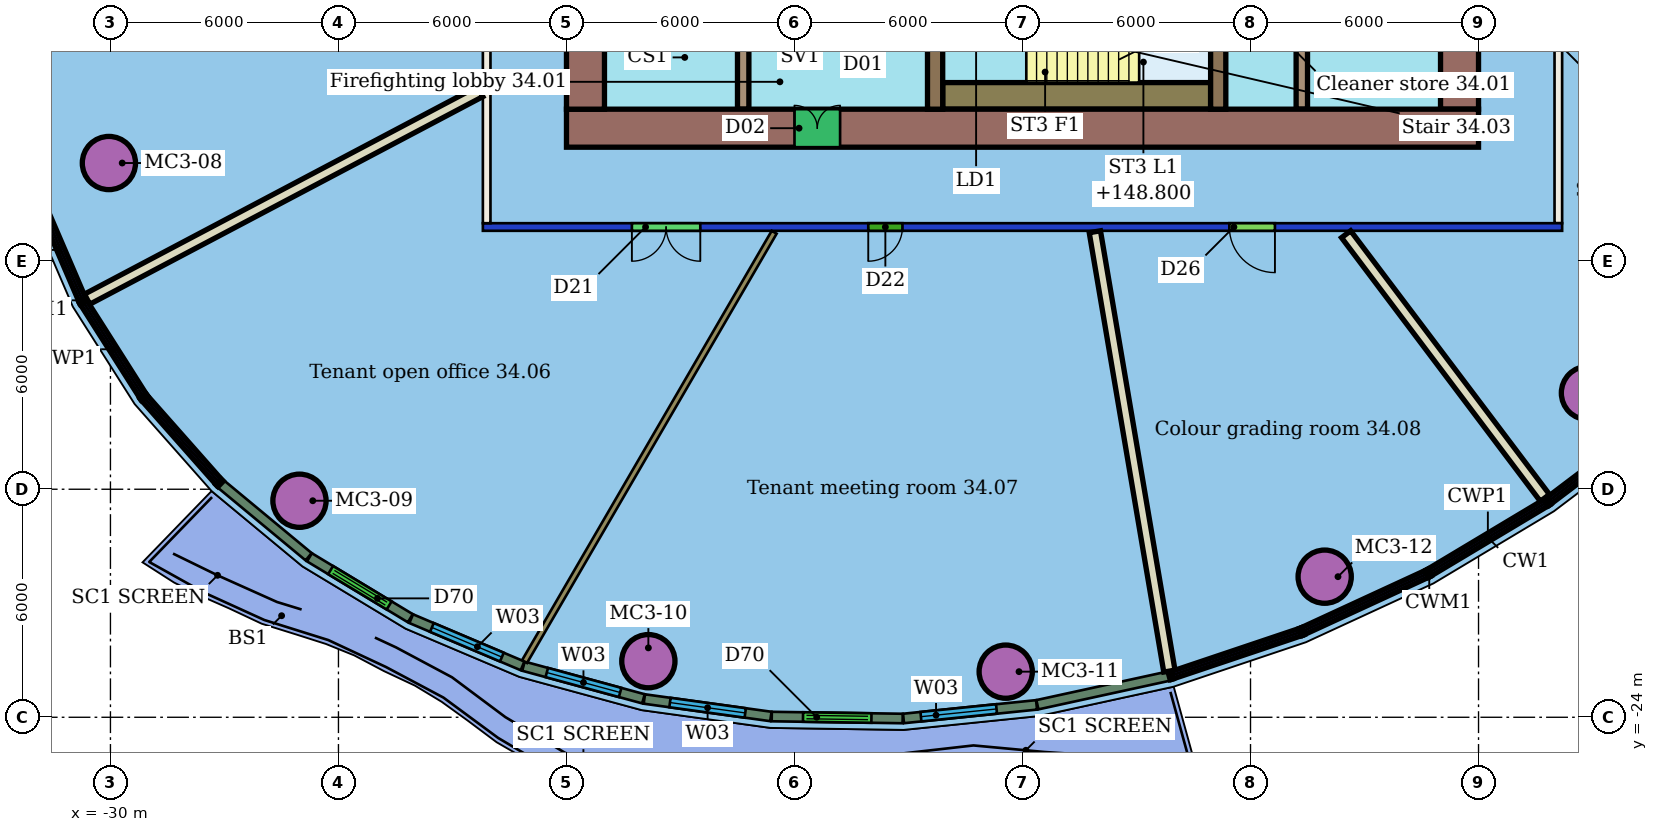
"""IFC4 building model, lengths in metres.
Left out: names, types, materials, properties, quantities, classifications, styles, units other than length and angle.
Written with IfcOpenShell. Run it as: python <this file> out.ifc"""

import sys

from ifc_helpers import new_model, si_unit, direction, frame, frame_2d, origin, origin_2d, place, context, subcontext, project, spatial, rectangle, hollow_circle, extrude, element, fill, save


model = new_model("IFC4")
c1 = context("Model", 3, precision=1e-05, world=origin(), true_north=direction((0.0, 1.0)))
c2 = subcontext(c1, "Body", "Model", "MODEL_VIEW")
j1 = project(units=[si_unit("LENGTHUNIT", "METRE"), si_unit("PLANEANGLEUNIT", "RADIAN")], contexts=[c1])
p1 = place(None, origin())
s1 = spatial("IfcSite", under=j1, at=p1, CompositionType="ELEMENT")
p2 = place(p1, origin())
s2 = spatial("IfcBuilding", under=s1, at=p2, CompositionType="ELEMENT")
p3 = place(p2, frame((0.0, 0.0, 147.0)))
s3 = spatial("IfcBuildingStorey", under=s2, at=p3, CompositionType="ELEMENT", Elevation=147.0)
for number, where, z_axis, x_axis in (
    (1, (-30.041, -9.417, 0.0), (0.0, 0.0, 1.0), (1.0, 0.0, 0.0)),
    (2, (-25.026, -18.303, 0.0), (0.0, 0.0, 1.0), (1.0, 0.0, 0.0)),
    (3, (-15.845, -22.524, 0.0), (0.0, 0.0, 1.0), (1.0, 0.0, 0.0)),
    (4, (-6.442, -22.8, 0.0), (0.0, 0.0, 1.0), (1.0, 0.0, 0.0)),
    (5, (1.952, -20.301, 0.0), (0.0, 0.0, 1.0), (1.0, 0.0, 0.0)),
    (6, (8.879, -15.467, 0.0), (0.0, 0.0, 1.0), (1.0, 0.0, 0.0)),
):
    element("IfcColumn", number, at=place(p3, frame(where, z_axis=z_axis, x_axis=x_axis)), inside=s3, PredefinedType="COLUMN", context=c2, shape_type="SweptSolid", body=[
        extrude(hollow_circle(Radius=0.7, WallThickness=0.05, at=origin_2d()), origin(), (0.0, 0.0, 1.0), 3.45),
    ])
p4 = place(p3, frame((8.2, -11.1, 0.0), z_axis=(0.0, 0.0, 1.0), x_axis=(-1.0, 0.0, 0.0)))
e7 = element("IfcWall", 7, at=p4, inside=s3, PredefinedType="PARTITIONING", context=c2, shape_type="SweptSolid", body=[
    extrude(rectangle(XDim=28.4, YDim=0.2, at=frame_2d((14.2, 0.0))), origin(), (0.0, 0.0, 1.0), 3.05),
])
p5 = place(p4, frame((22.679, 0.0, 0.0)))
e8 = element("IfcOpeningElement", 8, at=p5, cuts=e7, PredefinedType="OPENING", context=c2, shape_type="SweptSolid", body=[
    extrude(rectangle(XDim=1.8, YDim=2.1, at=frame_2d((0.9, 1.05))), frame((0.0, 0.11, 0.0), z_axis=(0.0, -1.0, 0.0), x_axis=(1.0, 0.0, 0.0)), (0.0, 0.0, 1.0), 0.22),
])
p6 = place(p4, frame((17.359, 0.0, 0.0)))
e9 = element("IfcOpeningElement", 9, at=p6, cuts=e7, PredefinedType="OPENING", context=c2, shape_type="SweptSolid", body=[
    extrude(rectangle(XDim=0.9, YDim=2.1, at=frame_2d((0.45, 1.05))), frame((0.0, 0.11, 0.0), z_axis=(0.0, -1.0, 0.0), x_axis=(1.0, 0.0, 0.0)), (0.0, 0.0, 1.0), 0.22),
])
p7 = place(p4, frame((7.557, 0.0, 0.0)))
e10 = element("IfcOpeningElement", 10, at=p7, cuts=e7, PredefinedType="OPENING", context=c2, shape_type="SweptSolid", body=[
    extrude(rectangle(XDim=1.2, YDim=2.1, at=frame_2d((0.6, 1.05))), frame((0.0, 0.11, 0.0), z_axis=(0.0, -1.0, 0.0), x_axis=(1.0, 0.0, 0.0)), (0.0, 0.0, 1.0), 0.22),
])
p8 = place(p3, frame((-20.1, -11.0, 0.0), z_axis=(0.0, 0.0, 1.0), x_axis=(0.0, 1.0, 0.0)))
e11 = element("IfcWall", 11, at=p8, inside=s3, PredefinedType="PARTITIONING", context=c2, shape_type="SweptSolid", body=[
    extrude(rectangle(XDim=22.0, YDim=0.2, at=frame_2d((11.0, 0.0))), origin(), (0.0, 0.0, 1.0), 3.45),
])
p9 = place(p8, frame((15.041, 0.0, 0.0)))
e12 = element("IfcOpeningElement", 12, at=p9, cuts=e11, PredefinedType="OPENING", context=c2, shape_type="SweptSolid", body=[
    extrude(rectangle(XDim=1.0, YDim=2.1, at=frame_2d((0.5, 1.05))), frame((0.0, 0.11, 0.0), z_axis=(0.0, -1.0, 0.0), x_axis=(1.0, 0.0, 0.0)), (0.0, 0.0, 1.0), 0.22),
])
p10 = place(p8, frame((9.277, 0.0, 0.0)))
e13 = element("IfcOpeningElement", 13, at=p10, cuts=e11, PredefinedType="OPENING", context=c2, shape_type="SweptSolid", body=[
    extrude(rectangle(XDim=1.8, YDim=2.4, at=frame_2d((0.9, 1.2))), frame((0.0, 0.11, 0.0), z_axis=(0.0, -1.0, 0.0), x_axis=(1.0, 0.0, 0.0)), (0.0, 0.0, 1.0), 0.22),
])
p11 = place(p3, frame((8.1, 11.0, 0.0), z_axis=(0.0, 0.0, 1.0), x_axis=(0.0, -1.0, 0.0)))
e14 = element("IfcWall", 14, at=p11, inside=s3, PredefinedType="PARTITIONING", context=c2, shape_type="SweptSolid", body=[
    extrude(rectangle(XDim=22.0, YDim=0.2, at=frame_2d((11.0, 0.0))), origin(), (0.0, 0.0, 1.0), 3.45),
])
p12 = place(p11, frame((16.187, 0.0, 0.0)))
e15 = element("IfcOpeningElement", 15, at=p12, cuts=e14, PredefinedType="OPENING", context=c2, shape_type="SweptSolid", body=[
    extrude(rectangle(XDim=1.2, YDim=2.1, at=frame_2d((0.6, 1.05))), frame((0.0, 0.11, 0.0), z_axis=(0.0, -1.0, 0.0), x_axis=(1.0, 0.0, 0.0)), (0.0, 0.0, 1.0), 0.22),
])
p13 = place(p11, frame((8.659, 0.0, 0.0)))
e16 = element("IfcOpeningElement", 16, at=p13, cuts=e14, PredefinedType="OPENING", context=c2, shape_type="SweptSolid", body=[
    extrude(rectangle(XDim=1.8, YDim=2.1, at=frame_2d((0.9, 1.05))), frame((0.0, 0.11, 0.0), z_axis=(0.0, -1.0, 0.0), x_axis=(1.0, 0.0, 0.0)), (0.0, 0.0, 1.0), 0.22),
])
p14 = place(p3, frame((-30.613, -12.999, 0.0), z_axis=(0.0, 0.0, 1.0), x_axis=(0.884254045952, 0.46700619077, 0.0)))
e17 = element("IfcWall", 17, at=p14, inside=s3, PredefinedType="PARTITIONING", context=c2, shape_type="SweptSolid", body=[
    extrude(rectangle(XDim=11.697, YDim=0.3, at=frame_2d((5.849, 0.0))), origin(), (0.0, 0.0, 1.0), 3.45),
])
p15 = place(p3, frame((-19.103, -22.534, 0.0), z_axis=(0.0, 0.0, 1.0), x_axis=(0.502674036835, 0.864476033613, 0.0)))
e18 = element("IfcWall", 18, at=p15, inside=s3, PredefinedType="PARTITIONING", context=c2, shape_type="SweptSolid", body=[
    extrude(rectangle(XDim=13.067, YDim=0.15, at=frame_2d((6.534, 0.0))), origin(), (0.0, 0.0, 1.0), 3.45),
])
p16 = place(p3, frame((-2.135, -22.786, 0.0), z_axis=(0.0, 0.0, 1.0), x_axis=(-0.167234468918, 0.985917152912, 0.0)))
e19 = element("IfcWall", 19, at=p16, inside=s3, PredefinedType="PARTITIONING", context=c2, shape_type="SweptSolid", body=[
    extrude(rectangle(XDim=11.726, YDim=0.3, at=frame_2d((5.863, 0.0))), origin(), (0.0, 0.0, 1.0), 3.45),
])
p17 = place(p3, frame((7.746, -18.227, 0.0), z_axis=(0.0, 0.0, 1.0), x_axis=(-0.602106567293, 0.798415732324, 0.0)))
e20 = element("IfcWall", 20, at=p17, inside=s3, PredefinedType="PARTITIONING", context=c2, shape_type="SweptSolid", body=[
    extrude(rectangle(XDim=8.688, YDim=0.3, at=frame_2d((4.344, 0.0))), origin(), (0.0, 0.0, 1.0), 3.45),
])
p18 = place(p3, frame((-27.088, -17.867, 0.0), z_axis=(0.0, 0.0, 1.0), x_axis=(0.769904678532, -0.638158903389, 0.0)))
e21 = element("IfcWall", 21, at=p18, inside=s3, PredefinedType="SOLIDWALL", context=c2, shape_type="SweptSolid", body=[
    extrude(rectangle(XDim=2.991, YDim=0.25, at=frame_2d((1.496, 0.0))), origin(), (0.0, 0.0, 1.0), 3.1),
])
p19 = place(p3, frame((-24.763, -19.791, 0.0), z_axis=(0.0, 0.0, 1.0), x_axis=(0.856079561846, -0.516844061386, 0.0)))
e22 = element("IfcWall", 22, at=p19, inside=s3, PredefinedType="SOLIDWALL", context=c2, shape_type="SweptSolid", body=[
    extrude(rectangle(XDim=3.101, YDim=0.25, at=frame_2d((1.551, 0.0))), origin(), (0.0, 0.0, 1.0), 3.1),
])
p20 = place(p19, frame((0.65, 0.0, 0.0)))
e23 = element("IfcOpeningElement", 23, at=p20, cuts=e22, PredefinedType="OPENING", context=c2, shape_type="SweptSolid", body=[
    extrude(rectangle(XDim=1.8, YDim=2.4, at=frame_2d((0.9, 1.2))), frame((0.0, 0.135, 0.0), z_axis=(0.0, -1.0, 0.0), x_axis=(1.0, 0.0, 0.0)), (0.0, 0.0, 1.0), 0.27),
])
p21 = place(p3, frame((-22.086, -21.406, 0.0), z_axis=(0.0, 0.0, 1.0), x_axis=(0.920752187735, -0.390147931919, 0.0)))
e24 = element("IfcWall", 24, at=p21, inside=s3, PredefinedType="SOLIDWALL", context=c2, shape_type="SweptSolid", body=[
    extrude(rectangle(XDim=3.183, YDim=0.25, at=frame_2d((1.591, 0.0))), origin(), (0.0, 0.0, 1.0), 3.1),
])
p22 = place(p21, frame((0.591, 0.0, 0.9)))
e25 = element("IfcOpeningElement", 25, at=p22, cuts=e24, PredefinedType="OPENING", context=c2, shape_type="SweptSolid", body=[
    extrude(rectangle(XDim=2.0, YDim=2.1, at=frame_2d((1.0, 1.05))), frame((0.0, 0.135, 0.0), z_axis=(0.0, -1.0, 0.0), x_axis=(1.0, 0.0, 0.0)), (0.0, 0.0, 1.0), 0.27),
])
p23 = place(p3, frame((-19.132, -22.656, 0.0), z_axis=(0.0, 0.0, 1.0), x_axis=(0.964946127674, -0.262448034261, 0.0)))
e26 = element("IfcWall", 26, at=p23, inside=s3, PredefinedType="SOLIDWALL", context=c2, shape_type="SweptSolid", body=[
    extrude(rectangle(XDim=3.272, YDim=0.25, at=frame_2d((1.636, 0.0))), origin(), (0.0, 0.0, 1.0), 3.1),
])
p24 = place(p23, frame((0.636, 0.0, 0.9)))
e27 = element("IfcOpeningElement", 27, at=p24, cuts=e26, PredefinedType="OPENING", context=c2, shape_type="SweptSolid", body=[
    extrude(rectangle(XDim=2.0, YDim=2.1, at=frame_2d((1.0, 1.05))), frame((0.0, 0.135, 0.0), z_axis=(0.0, -1.0, 0.0), x_axis=(1.0, 0.0, 0.0)), (0.0, 0.0, 1.0), 0.27),
])
p25 = place(p3, frame((-15.951, -23.519, 0.0), z_axis=(0.0, 0.0, 1.0), x_axis=(0.990602473809, -0.13677258089, 0.0)))
e28 = element("IfcWall", 28, at=p25, inside=s3, PredefinedType="SOLIDWALL", context=c2, shape_type="SweptSolid", body=[
    extrude(rectangle(XDim=3.361, YDim=0.25, at=frame_2d((1.681, 0.0))), origin(), (0.0, 0.0, 1.0), 3.1),
])
p26 = place(p25, frame((0.681, 0.0, 0.9)))
e29 = element("IfcOpeningElement", 29, at=p26, cuts=e28, PredefinedType="OPENING", context=c2, shape_type="SweptSolid", body=[
    extrude(rectangle(XDim=2.0, YDim=2.1, at=frame_2d((1.0, 1.05))), frame((0.0, 0.135, 0.0), z_axis=(0.0, -1.0, 0.0), x_axis=(1.0, 0.0, 0.0)), (0.0, 0.0, 1.0), 0.27),
])
p27 = place(p3, frame((-12.598, -23.981, 0.0), z_axis=(0.0, 0.0, 1.0), x_axis=(0.999886095883, -0.015092887706, 0.0)))
e30 = element("IfcWall", 30, at=p27, inside=s3, PredefinedType="SOLIDWALL", context=c2, shape_type="SweptSolid", body=[
    extrude(rectangle(XDim=3.446, YDim=0.25, at=frame_2d((1.723, 0.0))), origin(), (0.0, 0.0, 1.0), 3.1),
])
p28 = place(p27, frame((0.823, 0.0, 0.0)))
e31 = element("IfcOpeningElement", 31, at=p28, cuts=e30, PredefinedType="OPENING", context=c2, shape_type="SweptSolid", body=[
    extrude(rectangle(XDim=1.8, YDim=2.4, at=frame_2d((0.9, 1.2))), frame((0.0, 0.135, 0.0), z_axis=(0.0, -1.0, 0.0), x_axis=(1.0, 0.0, 0.0)), (0.0, 0.0, 1.0), 0.27),
])
p29 = place(p3, frame((-9.131, -24.032, 0.0), z_axis=(0.0, 0.0, 1.0), x_axis=(0.994814248005, 0.101708465554, 0.0)))
e32 = element("IfcWall", 32, at=p29, inside=s3, PredefinedType="SOLIDWALL", context=c2, shape_type="SweptSolid", body=[
    extrude(rectangle(XDim=3.519, YDim=0.25, at=frame_2d((1.76, 0.0))), origin(), (0.0, 0.0, 1.0), 3.1),
])
p30 = place(p29, frame((0.46, 0.0, 0.9)))
e33 = element("IfcOpeningElement", 33, at=p30, cuts=e32, PredefinedType="OPENING", context=c2, shape_type="SweptSolid", body=[
    extrude(rectangle(XDim=2.0, YDim=2.1, at=frame_2d((1.0, 1.05))), frame((0.0, 0.135, 0.0), z_axis=(0.0, -1.0, 0.0), x_axis=(1.0, 0.0, 0.0)), (0.0, 0.0, 1.0), 0.27),
])
p31 = place(p3, frame((-5.608, -23.67, 0.0), z_axis=(0.0, 0.0, 1.0), x_axis=(0.97705524613, 0.212986023038, 0.0)))
e34 = element("IfcWall", 34, at=p31, inside=s3, PredefinedType="SOLIDWALL", context=c2, shape_type="SweptSolid", body=[
    extrude(rectangle(XDim=3.534, YDim=0.25, at=frame_2d((1.767, 0.0))), origin(), (0.0, 0.0, 1.0), 3.1),
])
p32 = place(p3, frame((-18.0, -8.5, 0.0), z_axis=(0.0, 0.0, 1.0), x_axis=(1.0, 0.0, 0.0)))
e35 = element("IfcWall", 35, at=p32, inside=s3, PredefinedType="SHEAR", context=c2, shape_type="SweptSolid", body=[
    extrude(rectangle(XDim=24.0, YDim=1.0, at=frame_2d((12.0, 0.0))), origin(), (0.0, 0.0, 1.0), 3.3),
])
p33 = place(p32, frame((6.0, 0.0, 0.0)))
e36 = element("IfcOpeningElement", 36, at=p33, cuts=e35, PredefinedType="OPENING", context=c2, shape_type="SweptSolid", body=[
    extrude(rectangle(XDim=1.2, YDim=2.1, at=frame_2d((0.6, 1.05))), frame((0.0, 0.51, 0.0), z_axis=(0.0, -1.0, 0.0), x_axis=(1.0, 0.0, 0.0)), (0.0, 0.0, 1.0), 1.02),
])
p34 = place(p3, frame((-17.5, 8.0, 0.0), z_axis=(0.0, 0.0, 1.0), x_axis=(0.0, -1.0, 0.0)))
e37 = element("IfcWall", 37, at=p34, inside=s3, PredefinedType="SHEAR", context=c2, shape_type="SweptSolid", body=[
    extrude(rectangle(XDim=16.0, YDim=1.0, at=frame_2d((8.0, 0.0))), origin(), (0.0, 0.0, 1.0), 3.3),
])
p35 = place(p34, frame((11.9, 0.0, 0.0)))
e38 = element("IfcOpeningElement", 38, at=p35, cuts=e37, PredefinedType="OPENING", context=c2, shape_type="SweptSolid", body=[
    extrude(rectangle(XDim=1.2, YDim=2.1, at=frame_2d((0.6, 1.05))), frame((0.0, 0.51, 0.0), z_axis=(0.0, -1.0, 0.0), x_axis=(1.0, 0.0, 0.0)), (0.0, 0.0, 1.0), 1.02),
])
p36 = place(p34, frame((2.9, 0.0, 0.0)))
e39 = element("IfcOpeningElement", 39, at=p36, cuts=e37, PredefinedType="OPENING", context=c2, shape_type="SweptSolid", body=[
    extrude(rectangle(XDim=1.2, YDim=2.1, at=frame_2d((0.6, 1.05))), frame((0.0, 0.51, 0.0), z_axis=(0.0, -1.0, 0.0), x_axis=(1.0, 0.0, 0.0)), (0.0, 0.0, 1.0), 1.02),
])
p37 = place(p3, frame((5.5, -8.0, 0.0), z_axis=(0.0, 0.0, 1.0), x_axis=(0.0, 1.0, 0.0)))
e40 = element("IfcWall", 40, at=p37, inside=s3, PredefinedType="SHEAR", context=c2, shape_type="SweptSolid", body=[
    extrude(rectangle(XDim=16.0, YDim=1.0, at=frame_2d((8.0, 0.0))), origin(), (0.0, 0.0, 1.0), 3.3),
])
p38 = place(p37, frame((2.9, 0.0, 0.0)))
e41 = element("IfcOpeningElement", 41, at=p38, cuts=e40, PredefinedType="OPENING", context=c2, shape_type="SweptSolid", body=[
    extrude(rectangle(XDim=1.2, YDim=2.1, at=frame_2d((0.6, 1.05))), frame((0.0, 0.51, 0.0), z_axis=(0.0, -1.0, 0.0), x_axis=(1.0, 0.0, 0.0)), (0.0, 0.0, 1.0), 1.02),
])
p39 = place(p37, frame((11.9, 0.0, 0.0)))
e42 = element("IfcOpeningElement", 42, at=p39, cuts=e40, PredefinedType="OPENING", context=c2, shape_type="SweptSolid", body=[
    extrude(rectangle(XDim=1.2, YDim=2.1, at=frame_2d((0.6, 1.05))), frame((0.0, 0.51, 0.0), z_axis=(0.0, -1.0, 0.0), x_axis=(1.0, 0.0, 0.0)), (0.0, 0.0, 1.0), 1.02),
])
p40 = place(p3, frame((-13.35, 8.0, 0.0), z_axis=(0.0, 0.0, 1.0), x_axis=(0.0, -1.0, 0.0)))
e43 = element("IfcWall", 43, at=p40, inside=s3, PredefinedType="SHEAR", context=c2, shape_type="SweptSolid", body=[
    extrude(rectangle(XDim=16.0, YDim=0.3, at=frame_2d((8.0, 0.0))), origin(), (0.0, 0.0, 1.0), 3.3),
])
p41 = place(p40, frame((7.25, 0.0, 0.0)))
e44 = element("IfcOpeningElement", 44, at=p41, cuts=e43, PredefinedType="OPENING", context=c2, shape_type="SweptSolid", body=[
    extrude(rectangle(XDim=1.5, YDim=2.1, at=frame_2d((0.75, 1.05))), frame((0.0, 0.16, 0.0), z_axis=(0.0, -1.0, 0.0), x_axis=(1.0, 0.0, 0.0)), (0.0, 0.0, 1.0), 0.32),
])
p42 = place(p3, frame((1.35, -8.0, 0.0), z_axis=(0.0, 0.0, 1.0), x_axis=(0.0, 1.0, 0.0)))
e45 = element("IfcWall", 45, at=p42, inside=s3, PredefinedType="SHEAR", context=c2, shape_type="SweptSolid", body=[
    extrude(rectangle(XDim=16.0, YDim=0.3, at=frame_2d((8.0, 0.0))), origin(), (0.0, 0.0, 1.0), 3.3),
])
p43 = place(p42, frame((1.91, 0.0, 0.0)))
e46 = element("IfcOpeningElement", 46, at=p43, cuts=e45, PredefinedType="OPENING", context=c2, shape_type="SweptSolid", body=[
    extrude(rectangle(XDim=1.0, YDim=2.1, at=frame_2d((0.5, 1.05))), frame((0.0, 0.16, 0.0), z_axis=(0.0, -1.0, 0.0), x_axis=(1.0, 0.0, 0.0)), (0.0, 0.0, 1.0), 0.32),
])
p44 = place(p42, frame((7.25, 0.0, 0.0)))
e47 = element("IfcOpeningElement", 47, at=p44, cuts=e45, PredefinedType="OPENING", context=c2, shape_type="SweptSolid", body=[
    extrude(rectangle(XDim=1.5, YDim=2.1, at=frame_2d((0.75, 1.05))), frame((0.0, 0.16, 0.0), z_axis=(0.0, -1.0, 0.0), x_axis=(1.0, 0.0, 0.0)), (0.0, 0.0, 1.0), 0.32),
])
p45 = place(p3, frame((-8.3, -3.88, 0.0), z_axis=(0.0, 0.0, 1.0), x_axis=(0.0, -1.0, 0.0)))
e48 = element("IfcWall", 48, at=p45, inside=s3, PredefinedType="SHEAR", context=c2, shape_type="SweptSolid", body=[
    extrude(rectangle(XDim=4.12, YDim=0.4, at=frame_2d((2.06, 0.0))), origin(), (0.0, 0.0, 1.0), 3.3),
])
p46 = place(p45, frame((1.11, 0.0, 0.0)))
e49 = element("IfcOpeningElement", 49, at=p46, cuts=e48, PredefinedType="OPENING", context=c2, shape_type="SweptSolid", body=[
    extrude(rectangle(XDim=1.2, YDim=2.1, at=frame_2d((0.6, 1.05))), frame((0.0, 0.21, 0.0), z_axis=(0.0, -1.0, 0.0), x_axis=(1.0, 0.0, 0.0)), (0.0, 0.0, 1.0), 0.42),
])
p47 = place(p3, frame((-0.85, -3.88, 0.0), z_axis=(0.0, 0.0, 1.0), x_axis=(0.0, -1.0, 0.0)))
e50 = element("IfcWall", 50, at=p47, inside=s3, PredefinedType="SHEAR", context=c2, shape_type="SweptSolid", body=[
    extrude(rectangle(XDim=4.12, YDim=0.4, at=frame_2d((2.06, 0.0))), origin(), (0.0, 0.0, 1.0), 3.3),
])
p48 = place(p3, frame((-8.1, -7.65, 0.0), z_axis=(0.0, 0.0, 1.0), x_axis=(1.0, 0.0, 0.0)))
e51 = element("IfcWall", 51, at=p48, inside=s3, PredefinedType="SHEAR", context=c2, shape_type="SweptSolid", body=[
    extrude(rectangle(XDim=7.05, YDim=0.7, at=frame_2d((3.525, 0.0))), origin(), (0.0, 0.0, 1.0), 3.3),
])
p49 = place(p5, origin())
e52 = element("IfcDoor", 52, at=p49, inside=s3, OperationType="DOUBLE_DOOR_SINGLE_SWING", PredefinedType="DOOR", context=c2, shape_type="SweptSolid", body=[
    extrude(rectangle(XDim=1.8, YDim=2.1, at=frame_2d((0.9, 1.05))), frame((0.0, 0.025, 0.0), z_axis=(0.0, -1.0, 0.0), x_axis=(1.0, 0.0, 0.0)), (0.0, 0.0, 1.0), 0.05),
])
fill(e8, e52)
p50 = place(p6, origin())
e53 = element("IfcDoor", 53, at=p50, inside=s3, OperationType="SINGLE_SWING_RIGHT", PredefinedType="DOOR", context=c2, shape_type="SweptSolid", body=[
    extrude(rectangle(XDim=0.9, YDim=2.1, at=frame_2d((0.45, 1.05))), frame((0.0, 0.025, 0.0), z_axis=(0.0, -1.0, 0.0), x_axis=(1.0, 0.0, 0.0)), (0.0, 0.0, 1.0), 0.05),
])
fill(e9, e53)
p51 = place(p7, origin())
e54 = element("IfcDoor", 54, at=p51, inside=s3, OperationType="SINGLE_SWING_LEFT", PredefinedType="DOOR", context=c2, shape_type="SweptSolid", body=[
    extrude(rectangle(XDim=1.2, YDim=2.1, at=frame_2d((0.6, 1.05))), frame((0.0, 0.025, 0.0), z_axis=(0.0, -1.0, 0.0), x_axis=(1.0, 0.0, 0.0)), (0.0, 0.0, 1.0), 0.05),
])
fill(e10, e54)
p52 = place(p20, origin())
e55 = element("IfcDoor", 55, at=p52, inside=s3, OperationType="DOUBLE_DOOR_SLIDING", PredefinedType="DOOR", context=c2, shape_type="SweptSolid", body=[
    extrude(rectangle(XDim=1.8, YDim=2.4, at=frame_2d((0.9, 1.2))), frame((0.0, 0.025, 0.0), z_axis=(0.0, -1.0, 0.0), x_axis=(1.0, 0.0, 0.0)), (0.0, 0.0, 1.0), 0.05),
])
fill(e23, e55)
p53 = place(p22, origin())
e56 = element("IfcWindow", 56, at=p53, inside=s3, PartitioningType="SINGLE_PANEL", PredefinedType="WINDOW", context=c2, shape_type="SweptSolid", body=[
    extrude(rectangle(XDim=2.0, YDim=2.1, at=frame_2d((1.0, 1.05))), frame((0.0, 0.03, 0.0), z_axis=(0.0, -1.0, 0.0), x_axis=(1.0, 0.0, 0.0)), (0.0, 0.0, 1.0), 0.06),
])
fill(e25, e56)
p54 = place(p24, origin())
e57 = element("IfcWindow", 57, at=p54, inside=s3, PartitioningType="SINGLE_PANEL", PredefinedType="WINDOW", context=c2, shape_type="SweptSolid", body=[
    extrude(rectangle(XDim=2.0, YDim=2.1, at=frame_2d((1.0, 1.05))), frame((0.0, 0.03, 0.0), z_axis=(0.0, -1.0, 0.0), x_axis=(1.0, 0.0, 0.0)), (0.0, 0.0, 1.0), 0.06),
])
fill(e27, e57)
p55 = place(p26, origin())
e58 = element("IfcWindow", 58, at=p55, inside=s3, PartitioningType="SINGLE_PANEL", PredefinedType="WINDOW", context=c2, shape_type="SweptSolid", body=[
    extrude(rectangle(XDim=2.0, YDim=2.1, at=frame_2d((1.0, 1.05))), frame((0.0, 0.03, 0.0), z_axis=(0.0, -1.0, 0.0), x_axis=(1.0, 0.0, 0.0)), (0.0, 0.0, 1.0), 0.06),
])
fill(e29, e58)
p56 = place(p28, origin())
e59 = element("IfcDoor", 59, at=p56, inside=s3, OperationType="DOUBLE_DOOR_SLIDING", PredefinedType="DOOR", context=c2, shape_type="SweptSolid", body=[
    extrude(rectangle(XDim=1.8, YDim=2.4, at=frame_2d((0.9, 1.2))), frame((0.0, 0.025, 0.0), z_axis=(0.0, -1.0, 0.0), x_axis=(1.0, 0.0, 0.0)), (0.0, 0.0, 1.0), 0.05),
])
fill(e31, e59)
p57 = place(p30, origin())
e60 = element("IfcWindow", 60, at=p57, inside=s3, PartitioningType="SINGLE_PANEL", PredefinedType="WINDOW", context=c2, shape_type="SweptSolid", body=[
    extrude(rectangle(XDim=2.0, YDim=2.1, at=frame_2d((1.0, 1.05))), frame((0.0, 0.03, 0.0), z_axis=(0.0, -1.0, 0.0), x_axis=(1.0, 0.0, 0.0)), (0.0, 0.0, 1.0), 0.06),
])
fill(e33, e60)
p58 = place(p33, origin())
e61 = element("IfcDoor", 61, at=p58, inside=s3, OperationType="DOUBLE_DOOR_SINGLE_SWING", PredefinedType="NOTDEFINED", context=c2, shape_type="SweptSolid", body=[
    extrude(rectangle(XDim=1.2, YDim=2.1, at=frame_2d((0.6, 1.05))), frame((0.0, 0.025, 0.0), z_axis=(0.0, -1.0, 0.0), x_axis=(1.0, 0.0, 0.0)), (0.0, 0.0, 1.0), 0.05),
])
fill(e36, e61)
save(model, sys.argv[1])
